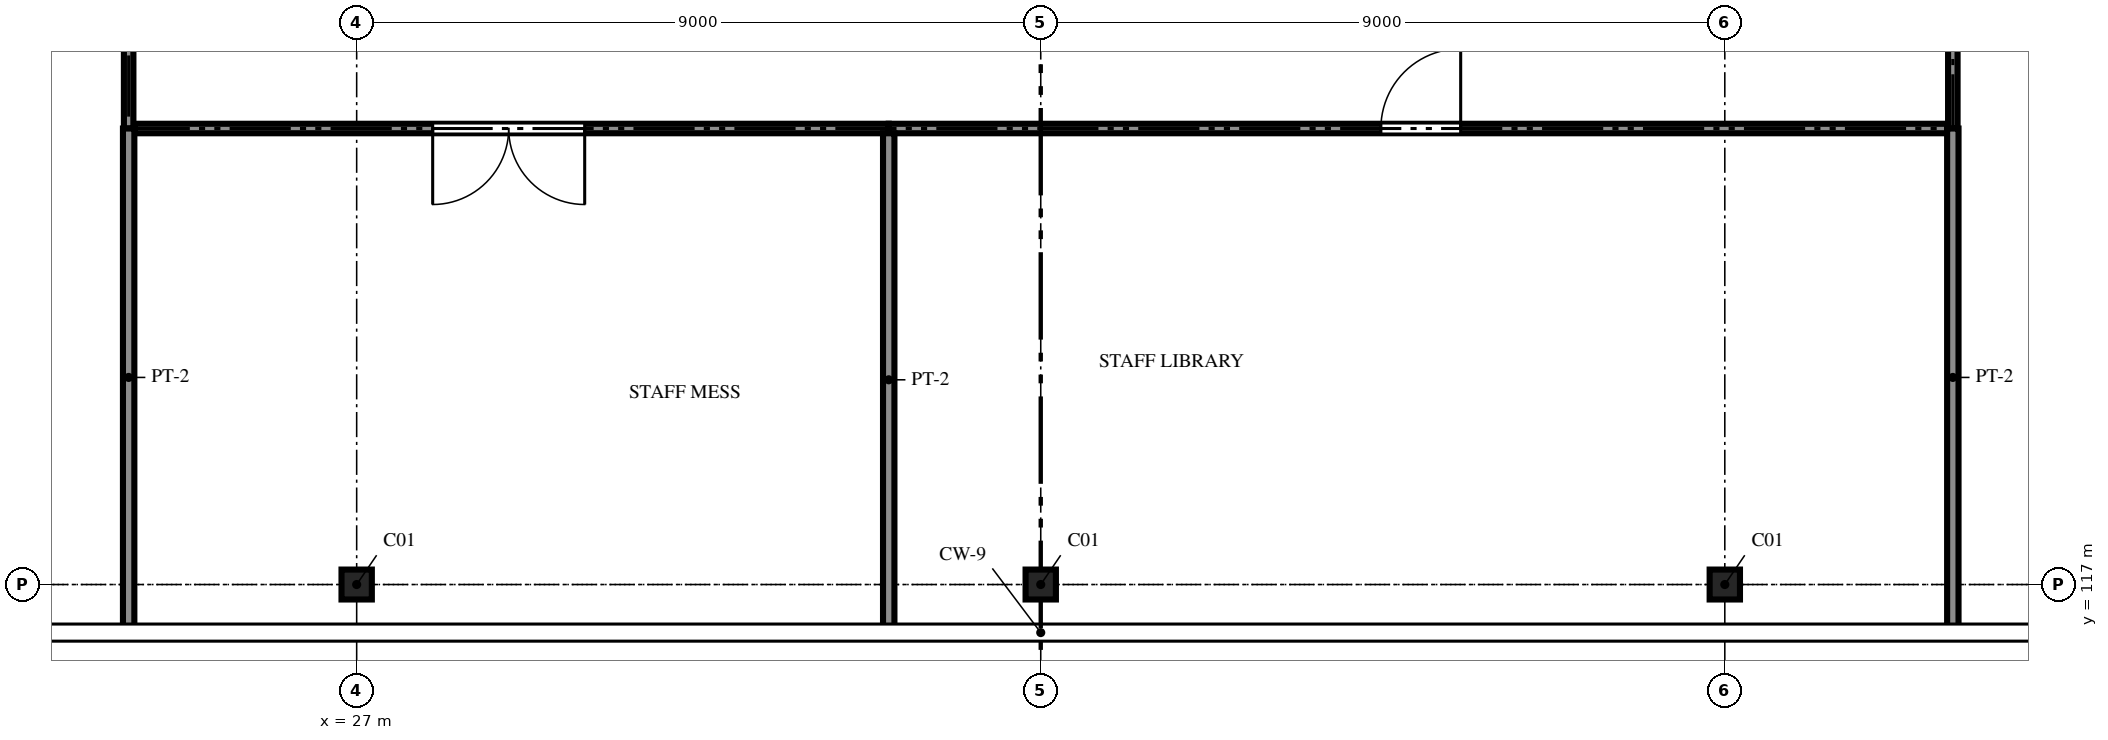
"""IFC4 building model, lengths in metres.
Left out: names, types, materials, properties, quantities, classifications, styles, units other than length and angle.
Written with IfcOpenShell. Run it as: python <this file> out.ifc"""

import sys

from ifc_helpers import new_model, si_unit, direction, frame, frame_2d, origin, origin_2d, place, context, subcontext, project, spatial, polyline, rectangle, i_section, outline, extrude, element, fill, save


model = new_model("IFC4")
c1 = context("Model", 3, precision=1e-05, world=origin(), true_north=direction((0.0, 1.0)))
c2 = subcontext(c1, "Body", "Model", "MODEL_VIEW")
j1 = project(units=[si_unit("LENGTHUNIT", "METRE"), si_unit("PLANEANGLEUNIT", "RADIAN")], contexts=[c1])
p1 = place(None, origin())
s1 = spatial("IfcSite", under=j1, at=p1, CompositionType="ELEMENT")
p2 = place(p1, origin())
s2 = spatial("IfcBuilding", under=s1, at=p2, CompositionType="ELEMENT")
p3 = place(p2, frame((0.0, 0.0, 7.5)))
s3 = spatial("IfcBuildingStorey", under=s2, at=p3, CompositionType="ELEMENT", Elevation=7.5)
for number, where, z_axis, x_axis in (
    (1, (27.0, 117.0, 0.0), (0.0, 0.0, 1.0), (1.0, 0.0, 0.0)),
    (2, (36.0, 117.0, 0.0), (0.0, 0.0, 1.0), (1.0, 0.0, 0.0)),
    (3, (45.0, 117.0, 0.0), (0.0, 0.0, 1.0), (1.0, 0.0, 0.0)),
):
    element("IfcColumn", number, at=place(p3, frame(where, z_axis=z_axis, x_axis=x_axis)), inside=s3, PredefinedType="COLUMN", context=c2, shape_type="SweptSolid", body=[
        extrude(i_section(OverallWidth=0.399, OverallDepth=0.394, WebThickness=0.016, FlangeThickness=0.025, FilletRadius=0.015, at=origin_2d()), origin(), (0.0, 0.0, 1.0), 4.2),
    ])
p4 = place(p3, frame((34.0, 123.0, 0.0), z_axis=(0.0, 0.0, 1.0), x_axis=(-1.0, 0.0, 0.0)))
e4 = element("IfcWall", 4, at=p4, inside=s3, PredefinedType="PARTITIONING", context=c2, shape_type="SweptSolid", body=[
    extrude(rectangle(XDim=9.925, YDim=0.125, at=frame_2d((4.962, 0.0))), origin(), (0.0, 0.0, 1.0), 3.307),
])
p5 = place(p4, frame((4.0, 0.0, 0.0)))
e5 = element("IfcOpeningElement", 5, at=p5, cuts=e4, PredefinedType="OPENING", context=c2, shape_type="SweptSolid", body=[
    extrude(rectangle(XDim=2.0, YDim=2.4, at=frame_2d((1.0, 1.2))), frame((0.0, 0.073, 0.0), z_axis=(0.0, -1.0, 0.0), x_axis=(1.0, 0.0, 0.0)), (0.0, 0.0, 1.0), 0.145),
])
p6 = place(p3, frame((47.925, 123.0, 0.0), z_axis=(0.0, 0.0, 1.0), x_axis=(-1.0, 0.0, 0.0)))
e6 = element("IfcWall", 6, at=p6, inside=s3, PredefinedType="PARTITIONING", context=c2, shape_type="SweptSolid", body=[
    extrude(rectangle(XDim=13.925, YDim=0.125, at=frame_2d((6.962, 0.0))), origin(), (0.0, 0.0, 1.0), 3.307),
])
p7 = place(p6, frame((6.4, 0.0, 0.0)))
e7 = element("IfcOpeningElement", 7, at=p7, cuts=e6, PredefinedType="OPENING", context=c2, shape_type="SweptSolid", body=[
    extrude(rectangle(XDim=1.05, YDim=2.1, at=frame_2d((0.525, 1.05))), frame((0.0, 0.073, 0.0), z_axis=(0.0, -1.0, 0.0), x_axis=(1.0, 0.0, 0.0)), (0.0, 0.0, 1.0), 0.145),
])
for number, where, z_axis, x_axis in (
    (8, (24.0, 123.0, 0.0), (0.0, 0.0, 1.0), (0.0, 1.0, 0.0)),
    (9, (48.0, 131.938, 0.0), (0.0, 0.0, 1.0), (0.0, -1.0, 0.0)),
):
    element("IfcWall", number, at=place(p3, frame(where, z_axis=z_axis, x_axis=x_axis)), inside=s3, PredefinedType="PARTITIONING", context=c2, shape_type="SweptSolid", body=[
        extrude(rectangle(XDim=8.938, YDim=0.125, at=frame_2d((4.469, 0.0))), origin(), (0.0, 0.0, 1.0), 3.307),
    ])
for number, where, z_axis, x_axis in (
    (10, (24.0, 123.0, 0.0), (0.0, 0.0, 1.0), (0.0, -1.0, 0.0)),
    (11, (48.0, 116.45, 0.0), (0.0, 0.0, 1.0), (0.0, 1.0, 0.0)),
):
    element("IfcWall", number, at=place(p3, frame(where, z_axis=z_axis, x_axis=x_axis)), inside=s3, PredefinedType="PARTITIONING", context=c2, shape_type="SweptSolid", body=[
        extrude(rectangle(XDim=6.55, YDim=0.15, at=frame_2d((3.275, 0.0))), origin(), (0.0, 0.0, 1.0), 3.307),
    ])
p8 = place(p3, frame((34.0, 122.938, 0.0), z_axis=(0.0, 0.0, 1.0), x_axis=(0.0, -1.0, 0.0)))
e12 = element("IfcWall", 12, at=p8, inside=s3, PredefinedType="PARTITIONING", context=c2, shape_type="SweptSolid", body=[
    extrude(rectangle(XDim=6.488, YDim=0.15, at=frame_2d((3.244, 0.0))), origin(), (0.0, 0.0, 1.0), 3.307),
])
p9 = place(p5, origin())
e13 = element("IfcDoor", 13, at=p9, inside=s3, OperationType="DOUBLE_DOOR_SINGLE_SWING", PredefinedType="DOOR", context=c2, shape_type="SweptSolid", body=[
    extrude(outline(polyline([(0.0, 0.0), (0.07, 0.0), (0.07, 2.33), (1.93, 2.33), (1.93, 0.0), (2.0, 0.0), (2.0, 2.4), (0.0, 2.4), (0.0, 0.0)])), frame((0.0, 0.025, 0.0), z_axis=(0.0, -1.0, 0.0), x_axis=(1.0, 0.0, 0.0)), (0.0, 0.0, 1.0), 0.05),
    extrude(outline(polyline([(0.074, 0.01), (0.997, 0.01), (0.997, 2.326), (0.074, 2.326), (0.074, 0.01)]), holes=[polyline([(0.194, 0.16), (0.877, 0.16), (0.877, 1.01), (0.194, 1.01), (0.194, 0.16)]), polyline([(0.385, 1.16), (0.686, 1.16), (0.686, 1.76), (0.385, 1.76), (0.385, 1.16)])]), frame((0.0, 0.017, 0.0), z_axis=(0.0, -1.0, 0.0), x_axis=(1.0, 0.0, 0.0)), (0.0, 0.0, 1.0), 0.035),
    extrude(rectangle(XDim=0.683, YDim=0.85, at=frame_2d((0.536, 0.585))), frame((0.0, 0.009, 0.0), z_axis=(0.0, -1.0, 0.0), x_axis=(1.0, 0.0, 0.0)), (0.0, 0.0, 1.0), 0.017),
    extrude(rectangle(XDim=0.3, YDim=0.6, at=frame_2d((0.536, 1.46))), frame((0.0, 0.006, 0.0), z_axis=(0.0, -1.0, 0.0), x_axis=(1.0, 0.0, 0.0)), (0.0, 0.0, 1.0), 0.012),
    extrude(outline(polyline([(1.003, 0.01), (1.926, 0.01), (1.926, 2.326), (1.003, 2.326), (1.003, 0.01)]), holes=[polyline([(1.123, 0.16), (1.806, 0.16), (1.806, 1.01), (1.123, 1.01), (1.123, 0.16)]), polyline([(1.314, 1.16), (1.615, 1.16), (1.615, 1.76), (1.314, 1.76), (1.314, 1.16)])]), frame((0.0, 0.017, 0.0), z_axis=(0.0, -1.0, 0.0), x_axis=(1.0, 0.0, 0.0)), (0.0, 0.0, 1.0), 0.035),
    extrude(rectangle(XDim=0.683, YDim=0.85, at=frame_2d((1.464, 0.585))), frame((0.0, 0.009, 0.0), z_axis=(0.0, -1.0, 0.0), x_axis=(1.0, 0.0, 0.0)), (0.0, 0.0, 1.0), 0.017),
    extrude(rectangle(XDim=0.3, YDim=0.6, at=frame_2d((1.464, 1.46))), frame((0.0, 0.006, 0.0), z_axis=(0.0, -1.0, 0.0), x_axis=(1.0, 0.0, 0.0)), (0.0, 0.0, 1.0), 0.012),
])
fill(e5, e13)
p10 = place(p7, frame((1.05, 0.0, 0.0), z_axis=(0.0, 0.0, 1.0), x_axis=(-1.0, 0.0, 0.0)))
e14 = element("IfcDoor", 14, at=p10, inside=s3, OperationType="SINGLE_SWING_RIGHT", PredefinedType="DOOR", context=c2, shape_type="SweptSolid", body=[
    extrude(outline(polyline([(0.0, 0.0), (0.07, 0.0), (0.07, 2.03), (0.98, 2.03), (0.98, 0.0), (1.05, 0.0), (1.05, 2.1), (0.0, 2.1), (0.0, 0.0)])), frame((0.0, 0.025, 0.0), z_axis=(0.0, -1.0, 0.0), x_axis=(1.0, 0.0, 0.0)), (0.0, 0.0, 1.0), 0.05),
    extrude(outline(polyline([(0.074, 0.01), (0.976, 0.01), (0.976, 2.026), (0.074, 2.026), (0.074, 0.01)]), holes=[polyline([(0.194, 0.16), (0.856, 0.16), (0.856, 1.01), (0.194, 1.01), (0.194, 0.16)]), polyline([(0.375, 1.16), (0.675, 1.16), (0.675, 1.76), (0.375, 1.76), (0.375, 1.16)])]), frame((0.0, 0.017, 0.0), z_axis=(0.0, -1.0, 0.0), x_axis=(1.0, 0.0, 0.0)), (0.0, 0.0, 1.0), 0.035),
    extrude(rectangle(XDim=0.662, YDim=0.85, at=frame_2d((0.525, 0.585))), frame((0.0, 0.009, 0.0), z_axis=(0.0, -1.0, 0.0), x_axis=(1.0, 0.0, 0.0)), (0.0, 0.0, 1.0), 0.017),
    extrude(rectangle(XDim=0.3, YDim=0.6, at=frame_2d((0.525, 1.46))), frame((0.0, 0.006, 0.0), z_axis=(0.0, -1.0, 0.0), x_axis=(1.0, 0.0, 0.0)), (0.0, 0.0, 1.0), 0.012),
])
fill(e7, e14)
save(model, sys.argv[1])
